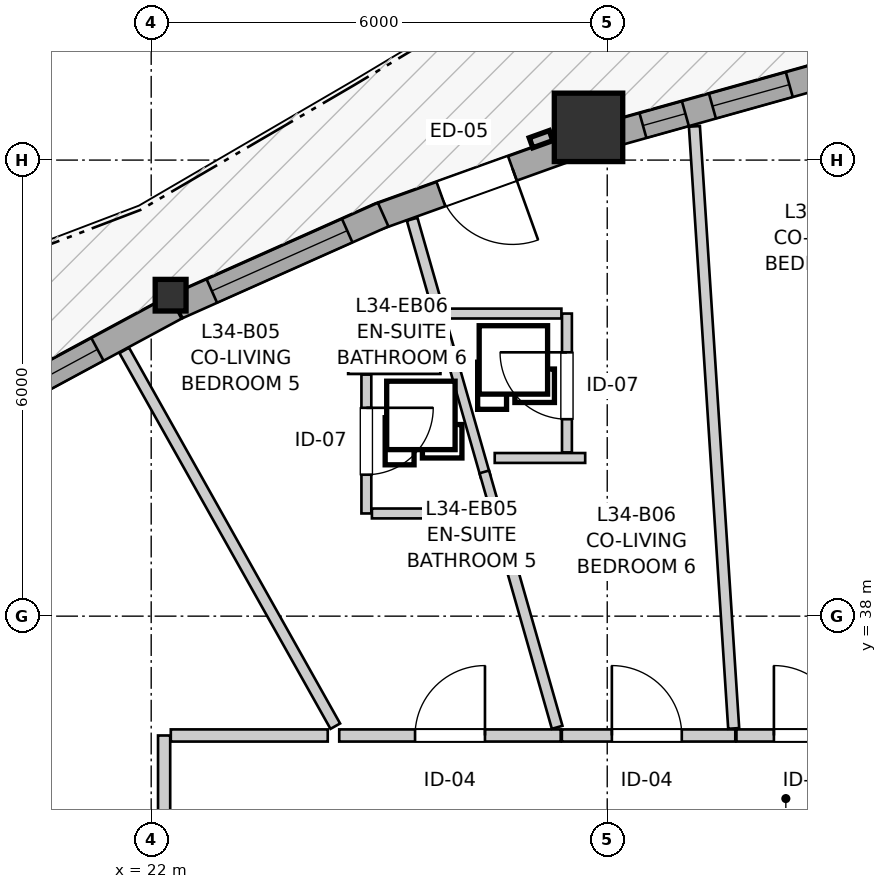
"""IFC4 building model, lengths in metres.
Left out: names, types, materials, properties, quantities, classifications, styles, units other than length and angle.
Written with IfcOpenShell. Run it as: python <this file> out.ifc"""

import sys

from ifc_helpers import new_model, si_unit, direction, frame, frame_2d, origin, origin_2d, place, context, subcontext, project, spatial, rectangle, i_section, extrude, source, transform, mapped, element, fill, save


model = new_model("IFC4")
c1 = context("Model", 3, precision=1e-05, world=origin(), true_north=direction((0.0, 1.0)))
c2 = subcontext(c1, "Body", "Model", "MODEL_VIEW")
j1 = project(units=[si_unit("LENGTHUNIT", "METRE"), si_unit("PLANEANGLEUNIT", "RADIAN")], contexts=[c1])
p1 = place(None, origin())
s1 = spatial("IfcSite", under=j1, at=p1, CompositionType="ELEMENT")
p2 = place(p1, origin())
s2 = spatial("IfcBuilding", under=s1, at=p2, CompositionType="ELEMENT")
p3 = place(p2, frame((0.0, 0.0, 115.2)))
s3 = spatial("IfcBuildingStorey", under=s2, at=p3, CompositionType="ELEMENT", Elevation=115.2)
m1 = source(origin(), c2, "Body", "SweptSolid", [
    extrude(rectangle(XDim=0.9, YDim=0.9, at=origin_2d()), origin(), (0.0, 0.0, 1.0), 2.95),
])
p4 = place(p3, frame((27.754, 44.431, 0.0), z_axis=(0.0, 0.0, 1.0), x_axis=(1.0, 0.0, 0.0)))
e1 = element("IfcColumn", 1, at=p4, inside=s3, PredefinedType="COLUMN", context=c2, shape_type="MappedRepresentation", body=[
    mapped(m1, transform((0.0, 0.0, 0.0), x_axis=(1.0, 0.0, 0.0), y_axis=(0.0, 1.0, 0.0), z_axis=(0.0, 0.0, 1.0), scale=1.0)),
])
m2 = source(origin(), c2, "Body", "SweptSolid", [
    extrude(i_section(OverallWidth=0.406, OverallDepth=0.416, WebThickness=0.027, FlangeThickness=0.044, FilletRadius=0.015, at=origin_2d()), origin(), (0.0, 0.0, 1.0), 2.95),
])
p5 = place(p3, frame((22.256, 42.222, 0.0), z_axis=(0.0, 0.0, 1.0), x_axis=(1.0, 0.0, 0.0)))
e2 = element("IfcColumn", 2, at=p5, inside=s3, PredefinedType="PILASTER", context=c2, shape_type="MappedRepresentation", body=[
    mapped(m2, transform((0.0, 0.0, 0.0), x_axis=(1.0, 0.0, 0.0), y_axis=(0.0, 1.0, 0.0), z_axis=(0.0, 0.0, 1.0), scale=1.0)),
])
p6 = place(p3, frame((30.755, 45.094, 0.0), z_axis=(0.0, 0.0, 1.0), x_axis=(-0.963040794714, -0.269355578589, 0.0)))
e3 = element("IfcWall", 3, at=p6, inside=s3, PredefinedType="SOLIDWALL", context=c2, shape_type="SweptSolid", body=[
    extrude(rectangle(XDim=2.839, YDim=0.34, at=frame_2d((1.419, 0.0))), origin(), (0.0, 0.0, 1.0), 2.48),
])
p7 = place(p6, frame((0.373, 0.0, 0.82)))
e4 = element("IfcOpeningElement", 4, at=p7, cuts=e3, PredefinedType="OPENING", context=c2, shape_type="SweptSolid", body=[
    extrude(rectangle(XDim=1.05, YDim=1.45, at=frame_2d((0.525, 0.725))), frame((0.0, 0.18, 0.0), z_axis=(0.0, -1.0, 0.0), x_axis=(1.0, 0.0, 0.0)), (0.0, 0.0, 1.0), 0.36),
])
p8 = place(p6, frame((1.792, 0.0, 0.82)))
e5 = element("IfcOpeningElement", 5, at=p8, cuts=e3, PredefinedType="OPENING", context=c2, shape_type="SweptSolid", body=[
    extrude(rectangle(XDim=0.58, YDim=1.35, at=frame_2d((0.29, 0.675))), frame((0.0, 0.18, 0.0), z_axis=(0.0, -1.0, 0.0), x_axis=(1.0, 0.0, 0.0)), (0.0, 0.0, 1.0), 0.36),
])
p9 = place(p3, frame((27.595, 44.193, 0.0), z_axis=(0.0, 0.0, 1.0), x_axis=(-0.94107471628, -0.338198726163, 0.0)))
e6 = element("IfcWall", 6, at=p9, inside=s3, PredefinedType="SOLIDWALL", context=c2, shape_type="SweptSolid", body=[
    extrude(rectangle(XDim=2.789, YDim=0.34, at=frame_2d((1.395, 0.0))), origin(), (0.0, 0.0, 1.0), 2.48),
])
p10 = place(p9, frame((0.895, 0.0, 0.0)))
e7 = element("IfcOpeningElement", 7, at=p10, cuts=e6, PredefinedType="OPENING", context=c2, shape_type="SweptSolid", body=[
    extrude(rectangle(XDim=1.0, YDim=2.1, at=frame_2d((0.5, 1.05))), frame((0.0, 0.18, 0.0), z_axis=(0.0, -1.0, 0.0), x_axis=(1.0, 0.0, 0.0)), (0.0, 0.0, 1.0), 0.36),
])
p11 = place(p3, frame((25.052, 43.283, 0.0), z_axis=(0.0, 0.0, 1.0), x_axis=(-0.913400340023, -0.407062426227, 0.0)))
e8 = element("IfcWall", 8, at=p11, inside=s3, PredefinedType="SOLIDWALL", context=c2, shape_type="SweptSolid", body=[
    extrude(rectangle(XDim=2.966, YDim=0.34, at=frame_2d((1.483, 0.0))), origin(), (0.0, 0.0, 1.0), 2.48),
])
p12 = place(p11, frame((0.518, 0.0, 0.82)))
e9 = element("IfcOpeningElement", 9, at=p12, cuts=e8, PredefinedType="OPENING", context=c2, shape_type="SweptSolid", body=[
    extrude(rectangle(XDim=1.95, YDim=1.4, at=frame_2d((0.975, 0.7))), frame((0.0, 0.18, 0.0), z_axis=(0.0, -1.0, 0.0), x_axis=(1.0, 0.0, 0.0)), (0.0, 0.0, 1.0), 0.36),
])
p13 = place(p3, frame((22.319, 42.063, 0.0), z_axis=(0.0, 0.0, 1.0), x_axis=(-0.880050731383, -0.4748796797, 0.0)))
e10 = element("IfcWall", 10, at=p13, inside=s3, PredefinedType="SOLIDWALL", context=c2, shape_type="SweptSolid", body=[
    extrude(rectangle(XDim=2.949, YDim=0.34, at=frame_2d((1.475, 0.0))), origin(), (0.0, 0.0, 1.0), 2.48),
])
p14 = place(p13, frame((1.166, 0.0, 0.82)))
e11 = element("IfcOpeningElement", 11, at=p14, cuts=e10, PredefinedType="OPENING", context=c2, shape_type="SweptSolid", body=[
    extrude(rectangle(XDim=1.4, YDim=1.35, at=frame_2d((0.7, 0.675))), frame((0.0, 0.18, 0.0), z_axis=(0.0, -1.0, 0.0), x_axis=(1.0, 0.0, 0.0)), (0.0, 0.0, 1.0), 0.36),
])
p15 = place(p3, frame((22.17, 29.865, 0.0), z_axis=(0.0, 0.0, 1.0), x_axis=(0.0, 1.0, 0.0)))
e12 = element("IfcWall", 12, at=p15, inside=s3, PredefinedType="PARTITIONING", context=c2, shape_type="SweptSolid", body=[
    extrude(rectangle(XDim=6.565, YDim=0.16, at=frame_2d((3.282, 0.0))), origin(), (0.0, 0.0, 1.0), 2.95),
])
p16 = place(p15, frame((2.811, 0.0, 0.0)))
e13 = element("IfcOpeningElement", 13, at=p16, cuts=e12, PredefinedType="OPENING", context=c2, shape_type="SweptSolid", body=[
    extrude(rectangle(XDim=0.96, YDim=2.1, at=frame_2d((0.48, 1.05))), frame((0.0, 0.09, 0.0), z_axis=(0.0, -1.0, 0.0), x_axis=(1.0, 0.0, 0.0)), (0.0, 0.0, 1.0), 0.18),
])
p17 = place(p3, frame((24.474, 36.43, 0.0), z_axis=(0.0, 0.0, 1.0), x_axis=(1.0, 0.0, 0.0)))
e14 = element("IfcWall", 14, at=p17, inside=s3, PredefinedType="PARTITIONING", context=c2, shape_type="SweptSolid", body=[
    extrude(rectangle(XDim=2.914, YDim=0.16, at=frame_2d((1.457, 0.0))), origin(), (0.0, 0.0, 1.0), 2.588),
])
p18 = place(p17, frame((0.998, 0.0, 0.0)))
e15 = element("IfcOpeningElement", 15, at=p18, cuts=e14, PredefinedType="OPENING", context=c2, shape_type="SweptSolid", body=[
    extrude(rectangle(XDim=0.92, YDim=2.1, at=frame_2d((0.46, 1.05))), frame((0.0, 0.09, 0.0), z_axis=(0.0, -1.0, 0.0), x_axis=(1.0, 0.0, 0.0)), (0.0, 0.0, 1.0), 0.18),
])
p19 = place(p3, frame((27.403, 36.43, 0.0), z_axis=(0.0, 0.0, 1.0), x_axis=(1.0, 0.0, 0.0)))
e16 = element("IfcWall", 16, at=p19, inside=s3, PredefinedType="PARTITIONING", context=c2, shape_type="SweptSolid", body=[
    extrude(rectangle(XDim=2.282, YDim=0.16, at=frame_2d((1.141, 0.0))), origin(), (0.0, 0.0, 1.0), 2.95),
])
p20 = place(p19, frame((0.658, 0.0, 0.0)))
e17 = element("IfcOpeningElement", 17, at=p20, cuts=e16, PredefinedType="OPENING", context=c2, shape_type="SweptSolid", body=[
    extrude(rectangle(XDim=0.92, YDim=2.1, at=frame_2d((0.46, 1.05))), frame((0.0, 0.09, 0.0), z_axis=(0.0, -1.0, 0.0), x_axis=(1.0, 0.0, 0.0)), (0.0, 0.0, 1.0), 0.18),
])
p21 = place(p3, frame((29.7, 36.43, 0.0), z_axis=(0.0, 0.0, 1.0), x_axis=(1.0, 0.0, 0.0)))
e18 = element("IfcWall", 18, at=p21, inside=s3, PredefinedType="PARTITIONING", context=c2, shape_type="SweptSolid", body=[
    extrude(rectangle(XDim=1.951, YDim=0.16, at=frame_2d((0.976, 0.0))), origin(), (0.0, 0.0, 1.0), 2.95),
])
p22 = place(p21, frame((0.493, 0.0, 0.0)))
e19 = element("IfcOpeningElement", 19, at=p22, cuts=e18, PredefinedType="OPENING", context=c2, shape_type="SweptSolid", body=[
    extrude(rectangle(XDim=0.92, YDim=2.1, at=frame_2d((0.46, 1.05))), frame((0.0, 0.09, 0.0), z_axis=(0.0, -1.0, 0.0), x_axis=(1.0, 0.0, 0.0)), (0.0, 0.0, 1.0), 0.18),
])
p23 = place(p3, frame((24.831, 41.178, 0.0), z_axis=(0.0, 0.0, 1.0), x_axis=(0.0, -1.0, 0.0)))
e20 = element("IfcWall", 20, at=p23, inside=s3, PredefinedType="PARTITIONING", context=c2, shape_type="SweptSolid", body=[
    extrude(rectangle(XDim=1.827, YDim=0.13, at=frame_2d((0.914, 0.0))), origin(), (0.0, 0.0, 1.0), 2.95),
])
p24 = place(p23, frame((0.437, 0.0, 0.0)))
e21 = element("IfcOpeningElement", 21, at=p24, cuts=e20, PredefinedType="OPENING", context=c2, shape_type="SweptSolid", body=[
    extrude(rectangle(XDim=0.88, YDim=2.05, at=frame_2d((0.44, 1.025))), frame((0.0, 0.075, 0.0), z_axis=(0.0, -1.0, 0.0), x_axis=(1.0, 0.0, 0.0)), (0.0, 0.0, 1.0), 0.15),
])
p25 = place(p3, frame((27.47, 40.154, 0.0), z_axis=(0.0, 0.0, 1.0), x_axis=(0.0, 1.0, 0.0)))
e22 = element("IfcWall", 22, at=p25, inside=s3, PredefinedType="PARTITIONING", context=c2, shape_type="SweptSolid", body=[
    extrude(rectangle(XDim=1.827, YDim=0.13, at=frame_2d((0.914, 0.0))), origin(), (0.0, 0.0, 1.0), 2.95),
])
p26 = place(p25, frame((0.437, 0.0, 0.0)))
e23 = element("IfcOpeningElement", 23, at=p26, cuts=e22, PredefinedType="OPENING", context=c2, shape_type="SweptSolid", body=[
    extrude(rectangle(XDim=0.88, YDim=2.05, at=frame_2d((0.44, 1.025))), frame((0.0, 0.075, 0.0), z_axis=(0.0, -1.0, 0.0), x_axis=(1.0, 0.0, 0.0)), (0.0, 0.0, 1.0), 0.15),
])
p27 = place(p3, frame((29.147, 44.444, 0.0), z_axis=(0.0, 0.0, 1.0), x_axis=(0.065112427166, -0.997877934333, 0.0)))
e24 = element("IfcWall", 24, at=p27, inside=s3, PredefinedType="PARTITIONING", context=c2, shape_type="SweptSolid", body=[
    extrude(rectangle(XDim=7.938, YDim=0.145, at=frame_2d((3.969, 0.0))), origin(), (0.0, 0.0, 1.0), 2.95),
])
p28 = place(p3, frame((21.645, 41.497, 0.0), z_axis=(0.0, 0.0, 1.0), x_axis=(0.489699005063, -0.871891555436, 0.0)))
e25 = element("IfcWall", 25, at=p28, inside=s3, PredefinedType="PARTITIONING", context=c2, shape_type="SweptSolid", body=[
    extrude(rectangle(XDim=5.671, YDim=0.145, at=frame_2d((2.835, 0.0))), origin(), (0.0, 0.0, 1.0), 2.95),
])
p29 = place(p3, frame((26.539, 39.351, 0.0), z_axis=(0.0, 0.0, 1.0), x_axis=(0.274214096408, -0.961668669205, 0.0)))
e26 = element("IfcWall", 26, at=p29, inside=s3, PredefinedType="PARTITIONING", context=c2, shape_type="SweptSolid", body=[
    extrude(rectangle(XDim=2.926, YDim=0.145, at=frame_2d((1.463, 0.0))), origin(), (0.0, 0.0, 1.0), 2.95),
])
p30 = place(p3, frame((22.258, 36.43, 0.0), z_axis=(0.0, 0.0, 1.0), x_axis=(1.0, 0.0, 0.0)))
e27 = element("IfcWall", 27, at=p30, inside=s3, PredefinedType="PARTITIONING", context=c2, shape_type="SweptSolid", body=[
    extrude(rectangle(XDim=2.065, YDim=0.16, at=frame_2d((1.032, 0.0))), origin(), (0.0, 0.0, 1.0), 2.95),
])
p31 = place(p3, frame((24.904, 39.351, 0.0), z_axis=(0.0, 0.0, 1.0), x_axis=(1.0, 0.0, 0.0)))
e28 = element("IfcWall", 28, at=p31, inside=s3, PredefinedType="PARTITIONING", context=c2, shape_type="SweptSolid", body=[
    extrude(rectangle(XDim=1.533, YDim=0.13, at=frame_2d((0.767, 0.0))), origin(), (0.0, 0.0, 1.0), 2.95),
])
p32 = place(p3, frame((25.882, 41.981, 0.0), z_axis=(0.0, 0.0, 1.0), x_axis=(1.0, 0.0, 0.0)))
e29 = element("IfcWall", 29, at=p32, inside=s3, PredefinedType="PARTITIONING", context=c2, shape_type="SweptSolid", body=[
    extrude(rectangle(XDim=1.515, YDim=0.13, at=frame_2d((0.757, 0.0))), origin(), (0.0, 0.0, 1.0), 2.95),
])
p33 = place(p3, frame((25.433, 43.222, 0.0), z_axis=(0.0, 0.0, 1.0), x_axis=(0.274641170969, -0.961546788882, 0.0)))
e30 = element("IfcWall", 30, at=p33, inside=s3, PredefinedType="PARTITIONING", context=c2, shape_type="SweptSolid", body=[
    extrude(rectangle(XDim=1.21, YDim=0.145, at=frame_2d((0.605, 0.0))), origin(), (0.0, 0.0, 1.0), 2.95),
])
p34 = place(p3, frame((25.93, 41.482, 0.0), z_axis=(0.0, 0.0, 1.0), x_axis=(0.274344452215, -0.961631489469, 0.0)))
e31 = element("IfcWall", 31, at=p34, inside=s3, PredefinedType="PARTITIONING", context=c2, shape_type="SweptSolid", body=[
    extrude(rectangle(XDim=1.712, YDim=0.13, at=frame_2d((0.856, 0.0))), origin(), (0.0, 0.0, 1.0), 2.95),
])
p35 = place(p3, frame((24.591, 41.251, 0.0), z_axis=(0.0, 0.0, 1.0), x_axis=(1.0, 0.0, 0.0)))
e32 = element("IfcWall", 32, at=p35, inside=s3, PredefinedType="PARTITIONING", context=c2, shape_type="SweptSolid", body=[
    extrude(rectangle(XDim=1.215, YDim=0.13, at=frame_2d((0.607, 0.0))), origin(), (0.0, 0.0, 1.0), 2.95),
])
p36 = place(p3, frame((26.52, 40.081, 0.0), z_axis=(0.0, 0.0, 1.0), x_axis=(1.0, 0.0, 0.0)))
e33 = element("IfcWall", 33, at=p36, inside=s3, PredefinedType="PARTITIONING", context=c2, shape_type="SweptSolid", body=[
    extrude(rectangle(XDim=1.19, YDim=0.13, at=frame_2d((0.595, 0.0))), origin(), (0.0, 0.0, 1.0), 2.95),
])
p37 = place(p3, frame((26.383, 39.898, 0.0), z_axis=(0.0, 0.0, 1.0), x_axis=(0.274982401426, -0.961449259663, 0.0)))
e34 = element("IfcWall", 34, at=p37, inside=s3, PredefinedType="PARTITIONING", context=c2, shape_type="SweptSolid", body=[
    extrude(rectangle(XDim=0.617, YDim=0.13, at=frame_2d((0.309, 0.0))), origin(), (0.0, 0.0, 1.0), 2.95),
])
p38 = place(p3, frame((25.755, 42.099, 0.0), z_axis=(0.0, 0.0, 1.0), x_axis=(0.273881956808, -0.961763314821, 0.0)))
e35 = element("IfcWall", 35, at=p38, inside=s3, PredefinedType="PARTITIONING", context=c2, shape_type="SweptSolid", body=[
    extrude(rectangle(XDim=0.692, YDim=0.13, at=frame_2d((0.346, 0.0))), origin(), (0.0, 0.0, 1.0), 2.95),
])
m3 = source(origin(), c2, "Body", "SweptSolid", [
    extrude(rectangle(XDim=1.05, YDim=1.45, at=frame_2d((0.525, 0.725))), frame((0.0, 0.03, 0.0), z_axis=(0.0, -1.0, 0.0), x_axis=(1.0, 0.0, 0.0)), (0.0, 0.0, 1.0), 0.06),
])
p39 = place(p7, origin())
e36 = element("IfcWindow", 36, at=p39, inside=s3, PartitioningType="SINGLE_PANEL", PredefinedType="WINDOW", context=c2, shape_type="MappedRepresentation", body=[
    mapped(m3, transform((0.0, 0.0, 0.0), x_axis=(1.0, 0.0, 0.0), y_axis=(0.0, 1.0, 0.0), z_axis=(0.0, 0.0, 1.0), scale=1.0)),
])
fill(e4, e36)
m4 = source(origin(), c2, "Body", "SweptSolid", [
    extrude(rectangle(XDim=0.58, YDim=1.35, at=frame_2d((0.29, 0.675))), frame((0.0, 0.03, 0.0), z_axis=(0.0, -1.0, 0.0), x_axis=(1.0, 0.0, 0.0)), (0.0, 0.0, 1.0), 0.06),
])
p40 = place(p8, origin())
e37 = element("IfcWindow", 37, at=p40, inside=s3, PartitioningType="SINGLE_PANEL", PredefinedType="WINDOW", context=c2, shape_type="MappedRepresentation", body=[
    mapped(m4, transform((0.0, 0.0, 0.0), x_axis=(1.0, 0.0, 0.0), y_axis=(0.0, 1.0, 0.0), z_axis=(0.0, 0.0, 1.0), scale=1.0)),
])
fill(e5, e37)
m5 = source(origin(), c2, "Body", "SweptSolid", [
    extrude(rectangle(XDim=1.95, YDim=1.4, at=frame_2d((0.975, 0.7))), frame((0.0, 0.03, 0.0), z_axis=(0.0, -1.0, 0.0), x_axis=(1.0, 0.0, 0.0)), (0.0, 0.0, 1.0), 0.06),
])
p41 = place(p12, origin())
e38 = element("IfcWindow", 38, at=p41, inside=s3, PartitioningType="SINGLE_PANEL", PredefinedType="WINDOW", context=c2, shape_type="MappedRepresentation", body=[
    mapped(m5, transform((0.0, 0.0, 0.0), x_axis=(1.0, 0.0, 0.0), y_axis=(0.0, 1.0, 0.0), z_axis=(0.0, 0.0, 1.0), scale=1.0)),
])
fill(e9, e38)
m6 = source(origin(), c2, "Body", "SweptSolid", [
    extrude(rectangle(XDim=1.4, YDim=1.35, at=frame_2d((0.7, 0.675))), frame((0.0, 0.03, 0.0), z_axis=(0.0, -1.0, 0.0), x_axis=(1.0, 0.0, 0.0)), (0.0, 0.0, 1.0), 0.06),
])
p42 = place(p14, origin())
e39 = element("IfcWindow", 39, at=p42, inside=s3, PartitioningType="SINGLE_PANEL", PredefinedType="WINDOW", context=c2, shape_type="MappedRepresentation", body=[
    mapped(m6, transform((0.0, 0.0, 0.0), x_axis=(1.0, 0.0, 0.0), y_axis=(0.0, 1.0, 0.0), z_axis=(0.0, 0.0, 1.0), scale=1.0)),
])
fill(e11, e39)
m7 = source(origin(), c2, "Body", "SweptSolid", [
    extrude(rectangle(XDim=1.0, YDim=2.1, at=frame_2d((0.5, 1.05))), frame((0.0, 0.025, 0.0), z_axis=(0.0, -1.0, 0.0), x_axis=(1.0, 0.0, 0.0)), (0.0, 0.0, 1.0), 0.05),
])
p43 = place(p10, origin())
e40 = element("IfcDoor", 40, at=p43, inside=s3, OperationType="SINGLE_SWING_LEFT", PredefinedType="DOOR", context=c2, shape_type="MappedRepresentation", body=[
    mapped(m7, transform((0.0, 0.0, 0.0), x_axis=(1.0, 0.0, 0.0), y_axis=(0.0, 1.0, 0.0), z_axis=(0.0, 0.0, 1.0), scale=1.0)),
])
fill(e7, e40)
m8 = source(origin(), c2, "Body", "SweptSolid", [
    extrude(rectangle(XDim=0.92, YDim=2.1, at=frame_2d((0.46, 1.05))), frame((0.0, 0.025, 0.0), z_axis=(0.0, -1.0, 0.0), x_axis=(1.0, 0.0, 0.0)), (0.0, 0.0, 1.0), 0.05),
])
p44 = place(p18, origin())
e41 = element("IfcDoor", 41, at=p44, inside=s3, OperationType="SINGLE_SWING_RIGHT", PredefinedType="DOOR", context=c2, shape_type="MappedRepresentation", body=[
    mapped(m8, transform((0.0, 0.0, 0.0), x_axis=(1.0, 0.0, 0.0), y_axis=(0.0, 1.0, 0.0), z_axis=(0.0, 0.0, 1.0), scale=1.0)),
])
fill(e15, e41)
p45 = place(p20, origin())
e42 = element("IfcDoor", 42, at=p45, inside=s3, OperationType="SINGLE_SWING_LEFT", PredefinedType="DOOR", context=c2, shape_type="MappedRepresentation", body=[
    mapped(m8, transform((0.0, 0.0, 0.0), x_axis=(1.0, 0.0, 0.0), y_axis=(0.0, 1.0, 0.0), z_axis=(0.0, 0.0, 1.0), scale=1.0)),
])
fill(e17, e42)
p46 = place(p22, origin())
e43 = element("IfcDoor", 43, at=p46, inside=s3, OperationType="SINGLE_SWING_LEFT", PredefinedType="DOOR", context=c2, shape_type="MappedRepresentation", body=[
    mapped(m8, transform((0.0, 0.0, 0.0), x_axis=(1.0, 0.0, 0.0), y_axis=(0.0, 1.0, 0.0), z_axis=(0.0, 0.0, 1.0), scale=1.0)),
])
fill(e19, e43)
m9 = source(origin(), c2, "Body", "SweptSolid", [
    extrude(rectangle(XDim=0.88, YDim=2.05, at=frame_2d((0.44, 1.025))), frame((0.0, 0.025, 0.0), z_axis=(0.0, -1.0, 0.0), x_axis=(1.0, 0.0, 0.0)), (0.0, 0.0, 1.0), 0.05),
])
p47 = place(p24, origin())
e44 = element("IfcDoor", 44, at=p47, inside=s3, OperationType="SINGLE_SWING_LEFT", PredefinedType="DOOR", context=c2, shape_type="MappedRepresentation", body=[
    mapped(m9, transform((0.0, 0.0, 0.0), x_axis=(1.0, 0.0, 0.0), y_axis=(0.0, 1.0, 0.0), z_axis=(0.0, 0.0, 1.0), scale=1.0)),
])
fill(e21, e44)
p48 = place(p26, origin())
e45 = element("IfcDoor", 45, at=p48, inside=s3, OperationType="SINGLE_SWING_RIGHT", PredefinedType="DOOR", context=c2, shape_type="MappedRepresentation", body=[
    mapped(m9, transform((0.0, 0.0, 0.0), x_axis=(1.0, 0.0, 0.0), y_axis=(0.0, 1.0, 0.0), z_axis=(0.0, 0.0, 1.0), scale=1.0)),
])
fill(e23, e45)
save(model, sys.argv[1])
